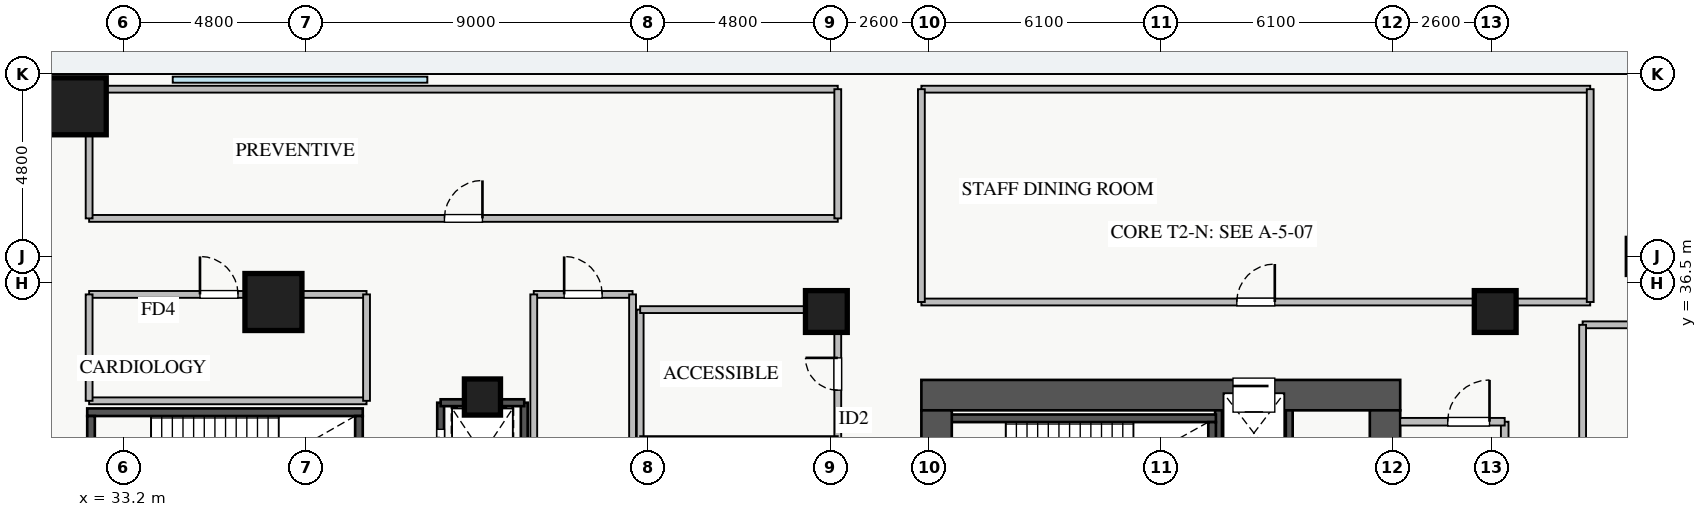
"""IFC4 building model, lengths in metres.
Left out: names, types, materials, properties, quantities, classifications, styles, units other than length and angle.
Written with IfcOpenShell. Run it as: python <this file> out.ifc"""

import sys

from ifc_helpers import new_model, si_unit, direction, frame, frame_2d, origin, origin_2d, place, context, subcontext, project, spatial, rectangle, extrude, source, transform, mapped, element, fill, save


model = new_model("IFC4")
c1 = context("Model", 3, precision=1e-05, world=origin(), true_north=direction((0.0, 1.0)))
c2 = subcontext(c1, "Body", "Model", "MODEL_VIEW")
j1 = project(units=[si_unit("LENGTHUNIT", "METRE"), si_unit("PLANEANGLEUNIT", "RADIAN")], contexts=[c1])
p1 = place(None, origin())
s1 = spatial("IfcSite", under=j1, at=p1, CompositionType="ELEMENT")
p2 = place(p1, origin())
s2 = spatial("IfcBuilding", under=s1, at=p2, CompositionType="ELEMENT")
p3 = place(p2, frame((0.0, 0.0, 9.4)))
s3 = spatial("IfcBuildingStorey", under=s2, at=p3, CompositionType="ELEMENT", Elevation=9.4)
for number, where, z_axis, x_axis in (
    (1, (62.02, 29.6, 0.0), (0.0, 0.0, 1.0), (0.0, 1.0, 0.0)),
    (2, (63.88, 29.6, 0.0), (0.0, 0.0, 1.0), (0.0, 1.0, 0.0)),
):
    element("IfcWall", number, at=place(p3, frame(where, z_axis=z_axis, x_axis=x_axis)), inside=s3, PredefinedType="SHEAR", context=c2, shape_type="SweptSolid", body=[
        extrude(rectangle(XDim=3.95, YDim=0.18, at=frame_2d((1.975, 0.0))), origin(), (0.0, 0.0, 1.0), 4.18),
    ])
p4 = place(p3, frame((41.55, 30.65, 0.0), z_axis=(0.0, 0.0, 1.0), x_axis=(0.0, 1.0, 0.0)))
e3 = element("IfcWall", 3, at=p4, inside=s3, PredefinedType="SHEAR", context=c2, shape_type="SweptSolid", body=[
    extrude(rectangle(XDim=2.7, YDim=0.18, at=frame_2d((1.35, 0.0))), origin(), (0.0, 0.0, 1.0), 4.18),
])
p5 = place(p4, frame((0.7, 0.0, 0.0)))
e4 = element("IfcOpeningElement", 4, at=p5, cuts=e3, PredefinedType="OPENING", context=c2, shape_type="SweptSolid", body=[
    extrude(rectangle(XDim=1.3, YDim=2.05, at=frame_2d((0.65, 1.025))), frame((0.0, 0.1, 0.0), z_axis=(0.0, -1.0, 0.0), x_axis=(1.0, 0.0, 0.0)), (0.0, 0.0, 1.0), 0.2),
])
p6 = place(p3, frame((43.75, 30.65, 0.0), z_axis=(0.0, 0.0, 1.0), x_axis=(0.0, 1.0, 0.0)))
e5 = element("IfcWall", 5, at=p6, inside=s3, PredefinedType="SHEAR", context=c2, shape_type="SweptSolid", body=[
    extrude(rectangle(XDim=2.7, YDim=0.18, at=frame_2d((1.35, 0.0))), origin(), (0.0, 0.0, 1.0), 4.18),
])
p7 = place(p3, frame((41.55, 33.35, 0.0), z_axis=(0.0, 0.0, 1.0), x_axis=(1.0, 0.0, 0.0)))
e6 = element("IfcWall", 6, at=p7, inside=s3, PredefinedType="SHEAR", context=c2, shape_type="SweptSolid", body=[
    extrude(rectangle(XDim=2.2, YDim=0.18, at=frame_2d((1.1, 0.0))), origin(), (0.0, 0.0, 1.0), 4.18),
])
p8 = place(p3, frame((54.8, 32.94, 0.0), z_axis=(0.0, 0.0, 1.0), x_axis=(1.0, 0.0, 0.0)))
e7 = element("IfcWall", 7, at=p8, inside=s3, PredefinedType="SHEAR", context=c2, shape_type="SweptSolid", body=[
    extrude(rectangle(XDim=7.15, YDim=0.2, at=frame_2d((3.575, 0.0))), origin(), (0.0, 0.0, 1.0), 4.4),
])
p9 = place(p3, frame((61.85, 29.9, 0.0), z_axis=(0.0, 0.0, 1.0), x_axis=(0.0, 1.0, 0.0)))
e8 = element("IfcWall", 8, at=p9, inside=s3, PredefinedType="SHEAR", context=c2, shape_type="SweptSolid", body=[
    extrude(rectangle(XDim=2.94, YDim=0.2, at=frame_2d((1.47, 0.0))), origin(), (0.0, 0.0, 1.0), 4.4),
])
p10 = place(p3, frame((32.25, 33.1, 0.0), z_axis=(0.0, 0.0, 1.0), x_axis=(1.0, 0.0, 0.0)))
e9 = element("IfcWall", 9, at=p10, inside=s3, PredefinedType="SHEAR", context=c2, shape_type="SweptSolid", body=[
    extrude(rectangle(XDim=7.25, YDim=0.2, at=frame_2d((3.625, 0.0))), origin(), (0.0, 0.0, 1.0), 4.4),
])
p11 = place(p3, frame((32.35, 29.96, 0.0), z_axis=(0.0, 0.0, 1.0), x_axis=(0.0, 1.0, 0.0)))
e10 = element("IfcWall", 10, at=p11, inside=s3, PredefinedType="SHEAR", context=c2, shape_type="SweptSolid", body=[
    extrude(rectangle(XDim=3.04, YDim=0.2, at=frame_2d((1.52, 0.0))), origin(), (0.0, 0.0, 1.0), 4.4),
])
p12 = place(p11, frame((0.95, 0.0, 0.0)))
e11 = element("IfcOpeningElement", 11, at=p12, cuts=e10, PredefinedType="OPENING", context=c2, shape_type="SweptSolid", body=[
    extrude(rectangle(XDim=1.1, YDim=2.05, at=frame_2d((0.55, 1.025))), frame((0.0, 0.11, 0.0), z_axis=(0.0, -1.0, 0.0), x_axis=(1.0, 0.0, 0.0)), (0.0, 0.0, 1.0), 0.22),
])
p13 = place(p3, frame((39.4, 29.96, 0.0), z_axis=(0.0, 0.0, 1.0), x_axis=(0.0, 1.0, 0.0)))
e12 = element("IfcWall", 12, at=p13, inside=s3, PredefinedType="SHEAR", context=c2, shape_type="SweptSolid", body=[
    extrude(rectangle(XDim=3.04, YDim=0.2, at=frame_2d((1.52, 0.0))), origin(), (0.0, 0.0, 1.0), 4.4),
])
p14 = place(p3, frame((54.2, 33.55, 0.0), z_axis=(0.0, 0.0, 1.0), x_axis=(1.0, 0.0, 0.0)))
e13 = element("IfcWall", 13, at=p14, inside=s3, PredefinedType="SHEAR", context=c2, shape_type="SweptSolid", body=[
    extrude(rectangle(XDim=12.6, YDim=0.8, at=frame_2d((6.3, 0.0))), origin(), (0.0, 0.0, 1.0), 4.4),
])
p15 = place(p14, frame((8.2, 0.0, 0.0)))
e14 = element("IfcOpeningElement", 14, at=p15, cuts=e13, PredefinedType="OPENING", context=c2, shape_type="SweptSolid", body=[
    extrude(rectangle(XDim=1.1, YDim=2.05, at=frame_2d((0.55, 1.025))), frame((0.0, 0.41, 0.0), z_axis=(0.0, -1.0, 0.0), x_axis=(1.0, 0.0, 0.0)), (0.0, 0.0, 1.0), 0.82),
])
p16 = place(p3, frame((54.6, 29.6, 0.0), z_axis=(0.0, 0.0, 1.0), x_axis=(0.0, 1.0, 0.0)))
e15 = element("IfcWall", 15, at=p16, inside=s3, PredefinedType="SHEAR", context=c2, shape_type="SweptSolid", body=[
    extrude(rectangle(XDim=3.55, YDim=0.8, at=frame_2d((1.775, 0.0))), origin(), (0.0, 0.0, 1.0), 4.4),
])
p17 = place(p16, frame((0.95, 0.0, 0.0)))
e16 = element("IfcOpeningElement", 16, at=p17, cuts=e15, PredefinedType="OPENING", context=c2, shape_type="SweptSolid", body=[
    extrude(rectangle(XDim=1.1, YDim=2.05, at=frame_2d((0.55, 1.025))), frame((0.0, 0.41, 0.0), z_axis=(0.0, -1.0, 0.0), x_axis=(1.0, 0.0, 0.0)), (0.0, 0.0, 1.0), 0.82),
])
p18 = place(p3, frame((66.4, 29.6, 0.0), z_axis=(0.0, 0.0, 1.0), x_axis=(0.0, 1.0, 0.0)))
e17 = element("IfcWall", 17, at=p18, inside=s3, PredefinedType="SHEAR", context=c2, shape_type="SweptSolid", body=[
    extrude(rectangle(XDim=3.55, YDim=0.8, at=frame_2d((1.775, 0.0))), origin(), (0.0, 0.0, 1.0), 4.4),
])
p19 = place(p18, frame((1.05, 0.0, 0.0)))
e18 = element("IfcOpeningElement", 18, at=p19, cuts=e17, PredefinedType="OPENING", context=c2, shape_type="SweptSolid", body=[
    extrude(rectangle(XDim=1.3, YDim=2.05, at=frame_2d((0.65, 1.025))), frame((0.0, 0.41, 0.0), z_axis=(0.0, -1.0, 0.0), x_axis=(1.0, 0.0, 0.0)), (0.0, 0.0, 1.0), 0.82),
])
m1 = source(origin(), c2, "Body", "SweptSolid", [
    extrude(rectangle(XDim=1.5, YDim=1.5, at=origin_2d()), origin(), (0.0, 0.0, 1.0), 4.4),
])
for number, where, z_axis, x_axis in (
    (19, (37.15, 36.0, 0.0), (0.0, 0.0, 1.0), (1.0, 0.0, 0.0)),
    (20, (32.0, 41.15, 0.0), (0.0, 0.0, 1.0), (1.0, 0.0, 0.0)),
):
    element("IfcColumn", number, at=place(p3, frame(where, z_axis=z_axis, x_axis=x_axis)), inside=s3, PredefinedType="COLUMN", context=c2, shape_type="MappedRepresentation", body=[
        mapped(m1, transform((0.0, 0.0, 0.0), x_axis=(1.0, 0.0, 0.0), y_axis=(0.0, 1.0, 0.0), z_axis=(0.0, 0.0, 1.0), scale=1.0)),
    ])
m2 = source(origin(), c2, "Body", "SweptSolid", [
    extrude(rectangle(XDim=1.1, YDim=1.1, at=origin_2d()), origin(), (0.0, 0.0, 1.0), 4.4),
])
for number, where, z_axis, x_axis in (
    (21, (69.3, 35.75, 0.0), (0.0, 0.0, 1.0), (1.0, 0.0, 0.0)),
    (22, (51.7, 35.75, 0.0), (0.0, 0.0, 1.0), (1.0, 0.0, 0.0)),
):
    element("IfcColumn", number, at=place(p3, frame(where, z_axis=z_axis, x_axis=x_axis)), inside=s3, PredefinedType="COLUMN", context=c2, shape_type="MappedRepresentation", body=[
        mapped(m2, transform((0.0, 0.0, 0.0), x_axis=(1.0, 0.0, 0.0), y_axis=(0.0, 1.0, 0.0), z_axis=(0.0, 0.0, 1.0), scale=1.0)),
    ])
m3 = source(origin(), c2, "Body", "SweptSolid", [
    extrude(rectangle(XDim=0.95, YDim=0.95, at=origin_2d()), origin(), (0.0, 0.0, 1.0), 4.4),
])
p20 = place(p3, frame((42.65, 33.5, 0.0), z_axis=(0.0, 0.0, 1.0), x_axis=(1.0, 0.0, 0.0)))
e23 = element("IfcColumn", 23, at=p20, inside=s3, PredefinedType="COLUMN", context=c2, shape_type="MappedRepresentation", body=[
    mapped(m3, transform((0.0, 0.0, 0.0), x_axis=(1.0, 0.0, 0.0), y_axis=(0.0, 1.0, 0.0), z_axis=(0.0, 0.0, 1.0), scale=1.0)),
])
p21 = place(p3, frame((69.55, 28.85, 0.0), z_axis=(0.0, 0.0, 1.0), x_axis=(0.0, 1.0, 0.0)))
e24 = element("IfcWall", 24, at=p21, inside=s3, PredefinedType="PARTITIONING", context=c2, shape_type="SweptSolid", body=[
    extrude(rectangle(XDim=4.0, YDim=0.2, at=frame_2d((2.0, 0.0))), origin(), (0.0, 0.0, 1.0), 4.18),
])
p22 = place(p3, frame((66.8, 32.85, 0.0), z_axis=(0.0, 0.0, 1.0), x_axis=(1.0, 0.0, 0.0)))
e25 = element("IfcWall", 25, at=p22, inside=s3, PredefinedType="PARTITIONING", context=c2, shape_type="SweptSolid", body=[
    extrude(rectangle(XDim=2.75, YDim=0.2, at=frame_2d((1.375, 0.0))), origin(), (0.0, 0.0, 1.0), 4.18),
])
p23 = place(p22, frame((1.25, 0.0, 0.0)))
e26 = element("IfcOpeningElement", 26, at=p23, cuts=e25, PredefinedType="OPENING", context=c2, shape_type="SweptSolid", body=[
    extrude(rectangle(XDim=1.1, YDim=2.05, at=frame_2d((0.55, 1.025))), frame((0.0, 0.11, 0.0), z_axis=(0.0, -1.0, 0.0), x_axis=(1.0, 0.0, 0.0)), (0.0, 0.0, 1.0), 0.22),
])
p24 = place(p3, frame((52.0, 25.2, 0.0), z_axis=(0.0, 0.0, 1.0), x_axis=(0.0, 1.0, 0.0)))
e27 = element("IfcWall", 27, at=p24, inside=s3, PredefinedType="PARTITIONING", context=c2, shape_type="SweptSolid", body=[
    extrude(rectangle(XDim=10.6, YDim=0.18, at=frame_2d((5.3, 0.0))), origin(), (0.0, 0.0, 1.0), 4.18),
])
p25 = place(p24, frame((1.375, 0.0, 0.0)))
e28 = element("IfcOpeningElement", 28, at=p25, cuts=e27, PredefinedType="OPENING", context=c2, shape_type="SweptSolid", body=[
    extrude(rectangle(XDim=0.85, YDim=2.05, at=frame_2d((0.425, 1.025))), frame((0.0, 0.1, 0.0), z_axis=(0.0, -1.0, 0.0), x_axis=(1.0, 0.0, 0.0)), (0.0, 0.0, 1.0), 0.2),
])
p26 = place(p24, frame((4.98, 0.0, 0.0)))
e29 = element("IfcOpeningElement", 29, at=p26, cuts=e27, PredefinedType="OPENING", context=c2, shape_type="SweptSolid", body=[
    extrude(rectangle(XDim=0.85, YDim=2.05, at=frame_2d((0.425, 1.025))), frame((0.0, 0.1, 0.0), z_axis=(0.0, -1.0, 0.0), x_axis=(1.0, 0.0, 0.0)), (0.0, 0.0, 1.0), 0.2),
])
p27 = place(p24, frame((8.48, 0.0, 0.0)))
e30 = element("IfcOpeningElement", 30, at=p27, cuts=e27, PredefinedType="OPENING", context=c2, shape_type="SweptSolid", body=[
    extrude(rectangle(XDim=0.85, YDim=2.05, at=frame_2d((0.425, 1.025))), frame((0.0, 0.1, 0.0), z_axis=(0.0, -1.0, 0.0), x_axis=(1.0, 0.0, 0.0)), (0.0, 0.0, 1.0), 0.2),
])
p28 = place(p3, frame((46.8, 25.2, 0.0), z_axis=(0.0, 0.0, 1.0), x_axis=(0.0, 1.0, 0.0)))
e31 = element("IfcWall", 31, at=p28, inside=s3, PredefinedType="PARTITIONING", context=c2, shape_type="SweptSolid", body=[
    extrude(rectangle(XDim=10.6, YDim=0.18, at=frame_2d((5.3, 0.0))), origin(), (0.0, 0.0, 1.0), 4.18),
])
p29 = place(p3, frame((46.8, 35.8, 0.0), z_axis=(0.0, 0.0, 1.0), x_axis=(1.0, 0.0, 0.0)))
e32 = element("IfcWall", 32, at=p29, inside=s3, PredefinedType="PARTITIONING", context=c2, shape_type="SweptSolid", body=[
    extrude(rectangle(XDim=5.2, YDim=0.18, at=frame_2d((2.6, 0.0))), origin(), (0.0, 0.0, 1.0), 4.18),
])
p30 = place(p3, frame((46.8, 32.41, 0.0), z_axis=(0.0, 0.0, 1.0), x_axis=(1.0, 0.0, 0.0)))
e33 = element("IfcWall", 33, at=p30, inside=s3, PredefinedType="PLUMBINGWALL", context=c2, shape_type="SweptSolid", body=[
    extrude(rectangle(XDim=5.2, YDim=0.12, at=frame_2d((2.6, 0.0))), origin(), (0.0, 0.0, 1.0), 4.18),
])
p31 = place(p3, frame((32.3, 33.4, 0.0), z_axis=(0.0, 0.0, 1.0), x_axis=(1.0, 0.0, 0.0)))
e34 = element("IfcWall", 34, at=p31, inside=s3, PredefinedType="PARTITIONING", context=c2, shape_type="SweptSolid", body=[
    extrude(rectangle(XDim=7.3, YDim=0.18, at=frame_2d((3.65, 0.0))), origin(), (0.0, 0.0, 1.0), 3.325),
])
p32 = place(p3, frame((32.3, 36.2, 0.0), z_axis=(0.0, 0.0, 1.0), x_axis=(1.0, 0.0, 0.0)))
e35 = element("IfcWall", 35, at=p32, inside=s3, PredefinedType="PARTITIONING", context=c2, shape_type="SweptSolid", body=[
    extrude(rectangle(XDim=7.3, YDim=0.18, at=frame_2d((3.65, 0.0))), origin(), (0.0, 0.0, 1.0), 4.18),
])
p33 = place(p32, frame((2.917, 0.0, 0.0)))
e36 = element("IfcOpeningElement", 36, at=p33, cuts=e35, PredefinedType="OPENING", context=c2, shape_type="SweptSolid", body=[
    extrude(rectangle(XDim=1.0, YDim=2.05, at=frame_2d((0.5, 1.025))), frame((0.0, 0.1, 0.0), z_axis=(0.0, -1.0, 0.0), x_axis=(1.0, 0.0, 0.0)), (0.0, 0.0, 1.0), 0.2),
])
for number, where, z_axis, x_axis in (
    (37, (32.3, 33.4, 0.0), (0.0, 0.0, 1.0), (0.0, 1.0, 0.0)),
    (38, (39.6, 33.4, 0.0), (0.0, 0.0, 1.0), (0.0, 1.0, 0.0)),
):
    element("IfcWall", number, at=place(p3, frame(where, z_axis=z_axis, x_axis=x_axis)), inside=s3, PredefinedType="PARTITIONING", context=c2, shape_type="SweptSolid", body=[
        extrude(rectangle(XDim=2.8, YDim=0.18, at=frame_2d((1.4, 0.0))), origin(), (0.0, 0.0, 1.0), 4.18),
    ])
p34 = place(p3, frame((44.0, 36.2, 0.0), z_axis=(0.0, 0.0, 1.0), x_axis=(1.0, 0.0, 0.0)))
e39 = element("IfcWall", 39, at=p34, inside=s3, PredefinedType="PARTITIONING", context=c2, shape_type="SweptSolid", body=[
    extrude(rectangle(XDim=2.6, YDim=0.18, at=frame_2d((1.3, 0.0))), origin(), (0.0, 0.0, 1.0), 4.18),
])
p35 = place(p34, frame((0.8, 0.0, 0.0)))
e40 = element("IfcOpeningElement", 40, at=p35, cuts=e39, PredefinedType="OPENING", context=c2, shape_type="SweptSolid", body=[
    extrude(rectangle(XDim=1.0, YDim=2.05, at=frame_2d((0.5, 1.025))), frame((0.0, 0.1, 0.0), z_axis=(0.0, -1.0, 0.0), x_axis=(1.0, 0.0, 0.0)), (0.0, 0.0, 1.0), 0.2),
])
for number, where, z_axis, x_axis in (
    (41, (44.0, 24.2, 0.0), (0.0, 0.0, 1.0), (0.0, 1.0, 0.0)),
    (42, (46.6, 24.2, 0.0), (0.0, 0.0, 1.0), (0.0, 1.0, 0.0)),
):
    element("IfcWall", number, at=place(p3, frame(where, z_axis=z_axis, x_axis=x_axis)), inside=s3, PredefinedType="PARTITIONING", context=c2, shape_type="SweptSolid", body=[
        extrude(rectangle(XDim=12.0, YDim=0.18, at=frame_2d((6.0, 0.0))), origin(), (0.0, 0.0, 1.0), 4.18),
    ])
p36 = place(p3, frame((71.6, 35.4, 0.0), z_axis=(0.0, 0.0, 1.0), x_axis=(1.0, 0.0, 0.0)))
e43 = element("IfcWall", 43, at=p36, inside=s3, PredefinedType="PARTITIONING", context=c2, shape_type="SweptSolid", body=[
    extrude(rectangle(XDim=2.15, YDim=0.18, at=frame_2d((1.075, 0.0))), origin(), (0.0, 0.0, 1.0), 4.18),
])
p37 = place(p3, frame((71.6, 10.6, 0.0), z_axis=(0.0, 0.0, 1.0), x_axis=(0.0, 1.0, 0.0)))
e44 = element("IfcWall", 44, at=p37, inside=s3, PredefinedType="PARTITIONING", context=c2, shape_type="SweptSolid", body=[
    extrude(rectangle(XDim=24.8, YDim=0.18, at=frame_2d((12.4, 0.0))), origin(), (0.0, 0.0, 1.0), 4.18),
])
p38 = place(p37, frame((11.9, 0.0, 0.0)))
e45 = element("IfcOpeningElement", 45, at=p38, cuts=e44, PredefinedType="OPENING", context=c2, shape_type="SweptSolid", body=[
    extrude(rectangle(XDim=1.0, YDim=2.05, at=frame_2d((0.5, 1.025))), frame((0.0, 0.1, 0.0), z_axis=(0.0, -1.0, 0.0), x_axis=(1.0, 0.0, 0.0)), (0.0, 0.0, 1.0), 0.2),
])
p39 = place(p3, frame((32.3, 38.2, 0.0), z_axis=(0.0, 0.0, 1.0), x_axis=(1.0, 0.0, 0.0)))
e46 = element("IfcWall", 46, at=p39, inside=s3, PredefinedType="PARTITIONING", context=c2, shape_type="SweptSolid", body=[
    extrude(rectangle(XDim=19.7, YDim=0.18, at=frame_2d((9.85, 0.0))), origin(), (0.0, 0.0, 1.0), 4.18),
])
p40 = place(p39, frame((9.35, 0.0, 0.0)))
e47 = element("IfcOpeningElement", 47, at=p40, cuts=e46, PredefinedType="OPENING", context=c2, shape_type="SweptSolid", body=[
    extrude(rectangle(XDim=1.0, YDim=2.05, at=frame_2d((0.5, 1.025))), frame((0.0, 0.1, 0.0), z_axis=(0.0, -1.0, 0.0), x_axis=(1.0, 0.0, 0.0)), (0.0, 0.0, 1.0), 0.2),
])
p41 = place(p3, frame((32.3, 41.6, 0.0), z_axis=(0.0, 0.0, 1.0), x_axis=(1.0, 0.0, 0.0)))
e48 = element("IfcWall", 48, at=p41, inside=s3, PredefinedType="PARTITIONING", context=c2, shape_type="SweptSolid", body=[
    extrude(rectangle(XDim=19.7, YDim=0.18, at=frame_2d((9.85, 0.0))), origin(), (0.0, 0.0, 1.0), 4.18),
])
for number, where, z_axis, x_axis in (
    (49, (32.3, 38.2, 0.0), (0.0, 0.0, 1.0), (0.0, 1.0, 0.0)),
    (50, (52.0, 38.2, 0.0), (0.0, 0.0, 1.0), (0.0, 1.0, 0.0)),
):
    element("IfcWall", number, at=place(p3, frame(where, z_axis=z_axis, x_axis=x_axis)), inside=s3, PredefinedType="PARTITIONING", context=c2, shape_type="SweptSolid", body=[
        extrude(rectangle(XDim=3.4, YDim=0.18, at=frame_2d((1.7, 0.0))), origin(), (0.0, 0.0, 1.0), 4.18),
    ])
p42 = place(p3, frame((54.2, 36.0, 0.0), z_axis=(0.0, 0.0, 1.0), x_axis=(1.0, 0.0, 0.0)))
e51 = element("IfcWall", 51, at=p42, inside=s3, PredefinedType="PARTITIONING", context=c2, shape_type="SweptSolid", body=[
    extrude(rectangle(XDim=17.6, YDim=0.18, at=frame_2d((8.8, 0.0))), origin(), (0.0, 0.0, 1.0), 3.675),
])
p43 = place(p42, frame((8.3, 0.0, 0.0)))
e52 = element("IfcOpeningElement", 52, at=p43, cuts=e51, PredefinedType="OPENING", context=c2, shape_type="SweptSolid", body=[
    extrude(rectangle(XDim=1.0, YDim=2.05, at=frame_2d((0.5, 1.025))), frame((0.0, 0.1, 0.0), z_axis=(0.0, -1.0, 0.0), x_axis=(1.0, 0.0, 0.0)), (0.0, 0.0, 1.0), 0.2),
])
p44 = place(p3, frame((54.2, 41.6, 0.0), z_axis=(0.0, 0.0, 1.0), x_axis=(1.0, 0.0, 0.0)))
e53 = element("IfcWall", 53, at=p44, inside=s3, PredefinedType="PARTITIONING", context=c2, shape_type="SweptSolid", body=[
    extrude(rectangle(XDim=17.6, YDim=0.18, at=frame_2d((8.8, 0.0))), origin(), (0.0, 0.0, 1.0), 4.18),
])
for number, where, z_axis, x_axis in (
    (54, (54.2, 36.0, 0.0), (0.0, 0.0, 1.0), (0.0, 1.0, 0.0)),
    (55, (71.8, 36.0, 0.0), (0.0, 0.0, 1.0), (0.0, 1.0, 0.0)),
):
    element("IfcWall", number, at=place(p3, frame(where, z_axis=z_axis, x_axis=x_axis)), inside=s3, PredefinedType="PARTITIONING", context=c2, shape_type="SweptSolid", body=[
        extrude(rectangle(XDim=5.6, YDim=0.18, at=frame_2d((2.8, 0.0))), origin(), (0.0, 0.0, 1.0), 4.18),
    ])
m4 = source(origin(), c2, "Body", "SweptSolid", [
    extrude(rectangle(XDim=1.1, YDim=2.05, at=frame_2d((0.55, 1.025))), frame((0.0, 0.025, 0.0), z_axis=(0.0, -1.0, 0.0), x_axis=(1.0, 0.0, 0.0)), (0.0, 0.0, 1.0), 0.05),
])
p45 = place(p15, origin())
e56 = element("IfcDoor", 56, at=p45, inside=s3, OperationType="SLIDING_TO_LEFT", PredefinedType="DOOR", context=c2, shape_type="MappedRepresentation", body=[
    mapped(m4, transform((0.0, 0.0, 0.0), x_axis=(1.0, 0.0, 0.0), y_axis=(0.0, 1.0, 0.0), z_axis=(0.0, 0.0, 1.0), scale=1.0)),
])
fill(e14, e56)
m5 = source(origin(), c2, "Body", "SweptSolid", [
    extrude(rectangle(XDim=1.3, YDim=2.05, at=frame_2d((0.65, 1.025))), frame((0.0, 0.025, 0.0), z_axis=(0.0, -1.0, 0.0), x_axis=(1.0, 0.0, 0.0)), (0.0, 0.0, 1.0), 0.05),
])
p46 = place(p5, origin())
e57 = element("IfcDoor", 57, at=p46, inside=s3, OperationType="SLIDING_TO_LEFT", PredefinedType="DOOR", context=c2, shape_type="MappedRepresentation", body=[
    mapped(m5, transform((0.0, 0.0, 0.0), x_axis=(1.0, 0.0, 0.0), y_axis=(0.0, 1.0, 0.0), z_axis=(0.0, 0.0, 1.0), scale=1.0)),
])
fill(e4, e57)
p47 = place(p23, origin())
e58 = element("IfcDoor", 58, at=p47, inside=s3, OperationType="SINGLE_SWING_RIGHT", PredefinedType="DOOR", context=c2, shape_type="MappedRepresentation", body=[
    mapped(m4, transform((0.0, 0.0, 0.0), x_axis=(1.0, 0.0, 0.0), y_axis=(0.0, 1.0, 0.0), z_axis=(0.0, 0.0, 1.0), scale=1.0)),
])
fill(e26, e58)
m6 = source(origin(), c2, "Body", "SweptSolid", [
    extrude(rectangle(XDim=0.85, YDim=2.05, at=frame_2d((0.425, 1.025))), frame((0.0, 0.025, 0.0), z_axis=(0.0, -1.0, 0.0), x_axis=(1.0, 0.0, 0.0)), (0.0, 0.0, 1.0), 0.05),
])
p48 = place(p27, origin())
e59 = element("IfcDoor", 59, at=p48, inside=s3, OperationType="SINGLE_SWING_RIGHT", PredefinedType="DOOR", context=c2, shape_type="MappedRepresentation", body=[
    mapped(m6, transform((0.0, 0.0, 0.0), x_axis=(1.0, 0.0, 0.0), y_axis=(0.0, 1.0, 0.0), z_axis=(0.0, 0.0, 1.0), scale=1.0)),
])
fill(e30, e59)
m7 = source(origin(), c2, "Body", "SweptSolid", [
    extrude(rectangle(XDim=1.0, YDim=2.05, at=frame_2d((0.5, 1.025))), frame((0.0, 0.025, 0.0), z_axis=(0.0, -1.0, 0.0), x_axis=(1.0, 0.0, 0.0)), (0.0, 0.0, 1.0), 0.05),
])
p49 = place(p33, origin())
e60 = element("IfcDoor", 60, at=p49, inside=s3, OperationType="SINGLE_SWING_LEFT", PredefinedType="DOOR", context=c2, shape_type="MappedRepresentation", body=[
    mapped(m7, transform((0.0, 0.0, 0.0), x_axis=(1.0, 0.0, 0.0), y_axis=(0.0, 1.0, 0.0), z_axis=(0.0, 0.0, 1.0), scale=1.0)),
])
fill(e36, e60)
p50 = place(p35, origin())
e61 = element("IfcDoor", 61, at=p50, inside=s3, OperationType="SINGLE_SWING_LEFT", PredefinedType="DOOR", context=c2, shape_type="MappedRepresentation", body=[
    mapped(m7, transform((0.0, 0.0, 0.0), x_axis=(1.0, 0.0, 0.0), y_axis=(0.0, 1.0, 0.0), z_axis=(0.0, 0.0, 1.0), scale=1.0)),
])
fill(e40, e61)
p51 = place(p40, origin())
e62 = element("IfcDoor", 62, at=p51, inside=s3, OperationType="SINGLE_SWING_RIGHT", PredefinedType="DOOR", context=c2, shape_type="MappedRepresentation", body=[
    mapped(m7, transform((0.0, 0.0, 0.0), x_axis=(1.0, 0.0, 0.0), y_axis=(0.0, 1.0, 0.0), z_axis=(0.0, 0.0, 1.0), scale=1.0)),
])
fill(e47, e62)
p52 = place(p43, origin())
e63 = element("IfcDoor", 63, at=p52, inside=s3, OperationType="SINGLE_SWING_RIGHT", PredefinedType="DOOR", context=c2, shape_type="MappedRepresentation", body=[
    mapped(m7, transform((0.0, 0.0, 0.0), x_axis=(1.0, 0.0, 0.0), y_axis=(0.0, 1.0, 0.0), z_axis=(0.0, 0.0, 1.0), scale=1.0)),
])
fill(e52, e63)
save(model, sys.argv[1])
